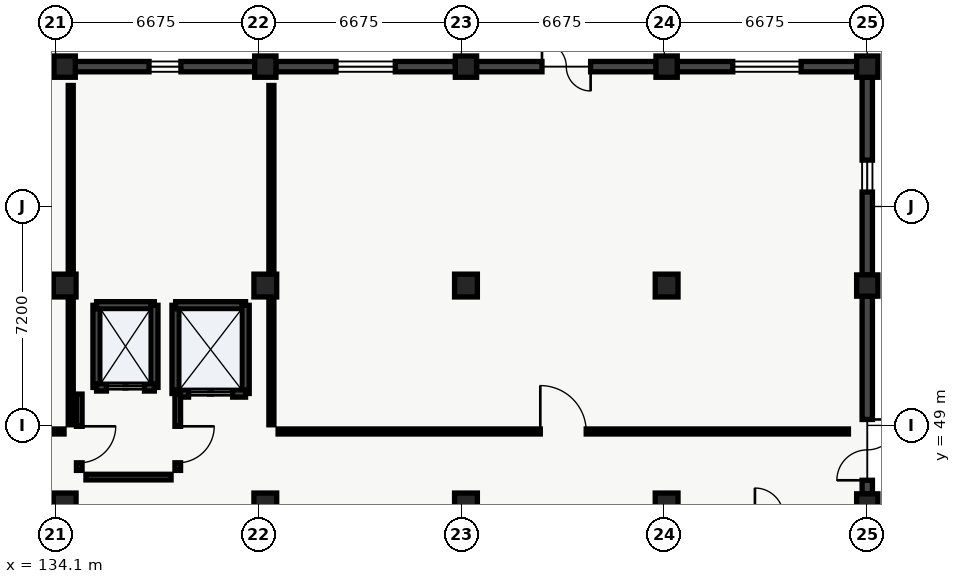
"""IFC4 building model, lengths in metres.
Left out: names, types, materials, properties, quantities, classifications, styles, units other than length and angle.
Written with IfcOpenShell. Run it as: python <this file> out.ifc"""

import sys

from ifc_helpers import new_model, si_unit, direction, frame, frame_2d, origin, origin_2d, place, context, subcontext, project, spatial, rectangle, extrude, element, fill, save


model = new_model("IFC4")
c1 = context("Model", 3, precision=1e-05, world=origin(), true_north=direction((0.0, 1.0)))
c2 = subcontext(c1, "Body", "Model", "MODEL_VIEW")
j1 = project(units=[si_unit("LENGTHUNIT", "METRE"), si_unit("PLANEANGLEUNIT", "RADIAN")], contexts=[c1])
p1 = place(None, origin())
s1 = spatial("IfcSite", under=j1, at=p1, CompositionType="ELEMENT")
p2 = place(p1, origin())
s2 = spatial("IfcBuilding", under=s1, at=p2, CompositionType="ELEMENT")
p3 = place(p2, origin())
s3 = spatial("IfcBuildingStorey", under=s2, at=p3, CompositionType="ELEMENT", Elevation=0.0)
for number, where, z_axis, x_axis in (
    (1, (134.4, 46.4, 0.0), (0.0, 0.0, 1.0), (1.0, 0.0, 0.0)),
    (2, (134.4, 53.6, 0.0), (0.0, 0.0, 1.0), (1.0, 0.0, 0.0)),
):
    element("IfcColumn", number, at=place(p3, frame(where, z_axis=z_axis, x_axis=x_axis)), inside=s3, PredefinedType="COLUMN", context=c2, shape_type="SweptSolid", body=[
        extrude(rectangle(XDim=0.75, YDim=0.75, at=origin_2d()), origin(), (0.0, 0.0, 1.0), 4.9),
    ])
p4 = place(p3, frame((134.4, 60.8, 0.0), z_axis=(0.0, 0.0, 1.0), x_axis=(1.0, 0.0, 0.0)))
e3 = element("IfcColumn", 3, at=p4, inside=s3, PredefinedType="COLUMN", context=c2, shape_type="SweptSolid", body=[
    extrude(rectangle(XDim=0.7, YDim=0.7, at=origin_2d()), origin(), (0.0, 0.0, 1.0), 4.9),
])
for number, where, z_axis, x_axis in (
    (4, (141.0, 46.4, 0.0), (0.0, 0.0, 1.0), (1.0, 0.0, 0.0)),
    (5, (141.0, 53.6, 0.0), (0.0, 0.0, 1.0), (1.0, 0.0, 0.0)),
):
    element("IfcColumn", number, at=place(p3, frame(where, z_axis=z_axis, x_axis=x_axis)), inside=s3, PredefinedType="COLUMN", context=c2, shape_type="SweptSolid", body=[
        extrude(rectangle(XDim=0.75, YDim=0.75, at=origin_2d()), origin(), (0.0, 0.0, 1.0), 4.9),
    ])
p5 = place(p3, frame((141.0, 60.8, 0.0), z_axis=(0.0, 0.0, 1.0), x_axis=(1.0, 0.0, 0.0)))
e6 = element("IfcColumn", 6, at=p5, inside=s3, PredefinedType="COLUMN", context=c2, shape_type="SweptSolid", body=[
    extrude(rectangle(XDim=0.7, YDim=0.7, at=origin_2d()), origin(), (0.0, 0.0, 1.0), 4.9),
])
for number, where, z_axis, x_axis in (
    (7, (147.6, 46.4, 0.0), (0.0, 0.0, 1.0), (1.0, 0.0, 0.0)),
    (8, (147.6, 53.6, 0.0), (0.0, 0.0, 1.0), (1.0, 0.0, 0.0)),
):
    element("IfcColumn", number, at=place(p3, frame(where, z_axis=z_axis, x_axis=x_axis)), inside=s3, PredefinedType="COLUMN", context=c2, shape_type="SweptSolid", body=[
        extrude(rectangle(XDim=0.75, YDim=0.75, at=origin_2d()), origin(), (0.0, 0.0, 1.0), 4.9),
    ])
p6 = place(p3, frame((147.6, 60.8, 0.0), z_axis=(0.0, 0.0, 1.0), x_axis=(1.0, 0.0, 0.0)))
e9 = element("IfcColumn", 9, at=p6, inside=s3, PredefinedType="COLUMN", context=c2, shape_type="SweptSolid", body=[
    extrude(rectangle(XDim=0.7, YDim=0.7, at=origin_2d()), origin(), (0.0, 0.0, 1.0), 4.9),
])
for number, where, z_axis, x_axis in (
    (10, (154.2, 46.4, 0.0), (0.0, 0.0, 1.0), (1.0, 0.0, 0.0)),
    (11, (154.2, 53.6, 0.0), (0.0, 0.0, 1.0), (1.0, 0.0, 0.0)),
):
    element("IfcColumn", number, at=place(p3, frame(where, z_axis=z_axis, x_axis=x_axis)), inside=s3, PredefinedType="COLUMN", context=c2, shape_type="SweptSolid", body=[
        extrude(rectangle(XDim=0.75, YDim=0.75, at=origin_2d()), origin(), (0.0, 0.0, 1.0), 4.9),
    ])
for number, where, z_axis, x_axis in (
    (12, (154.2, 60.8, 0.0), (0.0, 0.0, 1.0), (1.0, 0.0, 0.0)),
    (13, (160.8, 46.4, 0.0), (0.0, 0.0, 1.0), (1.0, 0.0, 0.0)),
    (14, (160.8, 53.6, 0.0), (0.0, 0.0, 1.0), (1.0, 0.0, 0.0)),
    (15, (160.8, 60.8, 0.0), (0.0, 0.0, 1.0), (1.0, 0.0, 0.0)),
):
    element("IfcColumn", number, at=place(p3, frame(where, z_axis=z_axis, x_axis=x_axis)), inside=s3, PredefinedType="COLUMN", context=c2, shape_type="SweptSolid", body=[
        extrude(rectangle(XDim=0.7, YDim=0.7, at=origin_2d()), origin(), (0.0, 0.0, 1.0), 4.9),
    ])
p7 = place(p3, frame((128.145, 60.8, 0.0), z_axis=(0.0, 0.0, 1.0), x_axis=(1.0, 0.0, 0.0)))
e16 = element("IfcWall", 16, at=p7, inside=s3, PredefinedType="SOLIDWALL", context=c2, shape_type="SweptSolid", body=[
    extrude(rectangle(XDim=5.91, YDim=0.34, at=frame_2d((2.955, 0.0))), origin(), (0.0, 0.0, 1.0), 4.435),
])
p8 = place(p7, frame((1.455, 0.0, 0.95)))
e17 = element("IfcOpeningElement", 17, at=p8, cuts=e16, PredefinedType="OPENING", context=c2, shape_type="SweptSolid", body=[
    extrude(rectangle(XDim=3.0, YDim=1.65, at=frame_2d((1.5, 0.825))), frame((0.0, 0.17, 0.0), z_axis=(0.0, -1.0, 0.0), x_axis=(1.0, 0.0, 0.0)), (0.0, 0.0, 1.0), 0.34),
])
p9 = place(p3, frame((134.745, 60.8, 0.0), z_axis=(0.0, 0.0, 1.0), x_axis=(1.0, 0.0, 0.0)))
e18 = element("IfcWall", 18, at=p9, inside=s3, PredefinedType="SOLIDWALL", context=c2, shape_type="SweptSolid", body=[
    extrude(rectangle(XDim=5.91, YDim=0.34, at=frame_2d((2.955, 0.0))), origin(), (0.0, 0.0, 1.0), 4.435),
])
p10 = place(p9, frame((2.43, 0.0, 0.95)))
e19 = element("IfcOpeningElement", 19, at=p10, cuts=e18, PredefinedType="OPENING", context=c2, shape_type="SweptSolid", body=[
    extrude(rectangle(XDim=1.05, YDim=1.2, at=frame_2d((0.525, 0.6))), frame((0.0, 0.17, 0.0), z_axis=(0.0, -1.0, 0.0), x_axis=(1.0, 0.0, 0.0)), (0.0, 0.0, 1.0), 0.34),
])
p11 = place(p3, frame((141.345, 60.8, 0.0), z_axis=(0.0, 0.0, 1.0), x_axis=(1.0, 0.0, 0.0)))
e20 = element("IfcWall", 20, at=p11, inside=s3, PredefinedType="SOLIDWALL", context=c2, shape_type="SweptSolid", body=[
    extrude(rectangle(XDim=5.91, YDim=0.34, at=frame_2d((2.955, 0.0))), origin(), (0.0, 0.0, 1.0), 4.435),
])
p12 = place(p11, frame((1.98, 0.0, 0.95)))
e21 = element("IfcOpeningElement", 21, at=p12, cuts=e20, PredefinedType="OPENING", context=c2, shape_type="SweptSolid", body=[
    extrude(rectangle(XDim=1.95, YDim=1.5, at=frame_2d((0.975, 0.75))), frame((0.0, 0.17, 0.0), z_axis=(0.0, -1.0, 0.0), x_axis=(1.0, 0.0, 0.0)), (0.0, 0.0, 1.0), 0.34),
])
p13 = place(p3, frame((147.945, 60.8, 0.0), z_axis=(0.0, 0.0, 1.0), x_axis=(1.0, 0.0, 0.0)))
e22 = element("IfcWall", 22, at=p13, inside=s3, PredefinedType="SOLIDWALL", context=c2, shape_type="SweptSolid", body=[
    extrude(rectangle(XDim=5.91, YDim=0.34, at=frame_2d((2.955, 0.0))), origin(), (0.0, 0.0, 1.0), 4.435),
])
p14 = place(p13, frame((2.155, 0.0, 0.0)))
e23 = element("IfcOpeningElement", 23, at=p14, cuts=e22, PredefinedType="OPENING", context=c2, shape_type="SweptSolid", body=[
    extrude(rectangle(XDim=1.6, YDim=2.2, at=frame_2d((0.8, 1.1))), frame((0.0, 0.17, 0.0), z_axis=(0.0, -1.0, 0.0), x_axis=(1.0, 0.0, 0.0)), (0.0, 0.0, 1.0), 0.34),
])
p15 = place(p3, frame((154.545, 60.8, 0.0), z_axis=(0.0, 0.0, 1.0), x_axis=(1.0, 0.0, 0.0)))
e24 = element("IfcWall", 24, at=p15, inside=s3, PredefinedType="SOLIDWALL", context=c2, shape_type="SweptSolid", body=[
    extrude(rectangle(XDim=5.91, YDim=0.34, at=frame_2d((2.955, 0.0))), origin(), (0.0, 0.0, 1.0), 4.435),
])
p16 = place(p15, frame((1.83, 0.0, 0.95)))
e25 = element("IfcOpeningElement", 25, at=p16, cuts=e24, PredefinedType="OPENING", context=c2, shape_type="SweptSolid", body=[
    extrude(rectangle(XDim=2.25, YDim=1.55, at=frame_2d((1.125, 0.775))), frame((0.0, 0.17, 0.0), z_axis=(0.0, -1.0, 0.0), x_axis=(1.0, 0.0, 0.0)), (0.0, 0.0, 1.0), 0.34),
])
p17 = place(p3, frame((160.8, 60.455, 0.0), z_axis=(0.0, 0.0, 1.0), x_axis=(0.0, -1.0, 0.0)))
e26 = element("IfcWall", 26, at=p17, inside=s3, PredefinedType="SOLIDWALL", context=c2, shape_type="SweptSolid", body=[
    extrude(rectangle(XDim=6.51, YDim=0.34, at=frame_2d((3.255, 0.0))), origin(), (0.0, 0.0, 1.0), 4.435),
])
p18 = place(p17, frame((2.73, 0.0, 0.95)))
e27 = element("IfcOpeningElement", 27, at=p18, cuts=e26, PredefinedType="OPENING", context=c2, shape_type="SweptSolid", body=[
    extrude(rectangle(XDim=1.05, YDim=1.2, at=frame_2d((0.525, 0.6))), frame((0.0, 0.17, 0.0), z_axis=(0.0, -1.0, 0.0), x_axis=(1.0, 0.0, 0.0)), (0.0, 0.0, 1.0), 0.34),
])
p19 = place(p3, frame((160.8, 53.255, 0.0), z_axis=(0.0, 0.0, 1.0), x_axis=(0.0, -1.0, 0.0)))
e28 = element("IfcWall", 28, at=p19, inside=s3, PredefinedType="SOLIDWALL", context=c2, shape_type="SweptSolid", body=[
    extrude(rectangle(XDim=6.51, YDim=0.34, at=frame_2d((3.255, 0.0))), origin(), (0.0, 0.0, 1.0), 4.435),
])
p20 = place(p19, frame((4.06, 0.0, 0.0)))
e29 = element("IfcOpeningElement", 29, at=p20, cuts=e28, PredefinedType="OPENING", context=c2, shape_type="SweptSolid", body=[
    extrude(rectangle(XDim=2.0, YDim=2.25, at=frame_2d((1.0, 1.125))), frame((0.0, 0.17, 0.0), z_axis=(0.0, -1.0, 0.0), x_axis=(1.0, 0.0, 0.0)), (0.0, 0.0, 1.0), 0.34),
])
p21 = place(p3, frame((135.45, 50.25, 0.0), z_axis=(0.0, 0.0, 1.0), x_axis=(0.0, 1.0, 0.0)))
e30 = element("IfcWall", 30, at=p21, inside=s3, PredefinedType="SHEAR", context=c2, shape_type="SweptSolid", body=[
    extrude(rectangle(XDim=2.7, YDim=0.24, at=frame_2d((1.35, 0.0))), origin(), (0.0, 0.0, 1.0), 4.88),
])
p22 = place(p3, frame((135.45, 52.95, 0.0), z_axis=(0.0, 0.0, 1.0), x_axis=(1.0, 0.0, 0.0)))
e31 = element("IfcWall", 31, at=p22, inside=s3, PredefinedType="SHEAR", context=c2, shape_type="SweptSolid", body=[
    extrude(rectangle(XDim=1.9, YDim=0.24, at=frame_2d((0.95, 0.0))), origin(), (0.0, 0.0, 1.0), 4.88),
])
p23 = place(p3, frame((137.35, 52.95, 0.0), z_axis=(0.0, 0.0, 1.0), x_axis=(0.0, -1.0, 0.0)))
e32 = element("IfcWall", 32, at=p23, inside=s3, PredefinedType="SHEAR", context=c2, shape_type="SweptSolid", body=[
    extrude(rectangle(XDim=2.7, YDim=0.24, at=frame_2d((1.35, 0.0))), origin(), (0.0, 0.0, 1.0), 4.88),
])
p24 = place(p3, frame((137.35, 50.25, 0.0), z_axis=(0.0, 0.0, 1.0), x_axis=(-1.0, 0.0, 0.0)))
e33 = element("IfcWall", 33, at=p24, inside=s3, PredefinedType="SHEAR", context=c2, shape_type="SweptSolid", body=[
    extrude(rectangle(XDim=1.9, YDim=0.24, at=frame_2d((0.95, 0.0))), origin(), (0.0, 0.0, 1.0), 4.88),
])
p25 = place(p24, frame((0.325, 0.0, 0.0)))
e34 = element("IfcOpeningElement", 34, at=p25, cuts=e33, PredefinedType="OPENING", context=c2, shape_type="SweptSolid", body=[
    extrude(rectangle(XDim=1.25, YDim=2.2, at=frame_2d((0.625, 1.1))), frame((0.0, 0.12, 0.0), z_axis=(0.0, -1.0, 0.0), x_axis=(1.0, 0.0, 0.0)), (0.0, 0.0, 1.0), 0.24),
])
p26 = place(p3, frame((138.05, 50.05, 0.0), z_axis=(0.0, 0.0, 1.0), x_axis=(0.0, 1.0, 0.0)))
e35 = element("IfcWall", 35, at=p26, inside=s3, PredefinedType="SHEAR", context=c2, shape_type="SweptSolid", body=[
    extrude(rectangle(XDim=2.9, YDim=0.24, at=frame_2d((1.45, 0.0))), origin(), (0.0, 0.0, 1.0), 4.88),
])
p27 = place(p3, frame((138.05, 52.95, 0.0), z_axis=(0.0, 0.0, 1.0), x_axis=(1.0, 0.0, 0.0)))
e36 = element("IfcWall", 36, at=p27, inside=s3, PredefinedType="SHEAR", context=c2, shape_type="SweptSolid", body=[
    extrude(rectangle(XDim=2.3, YDim=0.24, at=frame_2d((1.15, 0.0))), origin(), (0.0, 0.0, 1.0), 4.88),
])
p28 = place(p3, frame((140.35, 52.95, 0.0), z_axis=(0.0, 0.0, 1.0), x_axis=(0.0, -1.0, 0.0)))
e37 = element("IfcWall", 37, at=p28, inside=s3, PredefinedType="SHEAR", context=c2, shape_type="SweptSolid", body=[
    extrude(rectangle(XDim=2.9, YDim=0.24, at=frame_2d((1.45, 0.0))), origin(), (0.0, 0.0, 1.0), 4.88),
])
p29 = place(p3, frame((140.35, 50.05, 0.0), z_axis=(0.0, 0.0, 1.0), x_axis=(-1.0, 0.0, 0.0)))
e38 = element("IfcWall", 38, at=p29, inside=s3, PredefinedType="SHEAR", context=c2, shape_type="SweptSolid", body=[
    extrude(rectangle(XDim=2.3, YDim=0.24, at=frame_2d((1.15, 0.0))), origin(), (0.0, 0.0, 1.0), 4.88),
])
p30 = place(p29, frame((0.425, 0.0, 0.0)))
e39 = element("IfcOpeningElement", 39, at=p30, cuts=e38, PredefinedType="OPENING", context=c2, shape_type="SweptSolid", body=[
    extrude(rectangle(XDim=1.45, YDim=2.3, at=frame_2d((0.725, 1.15))), frame((0.0, 0.12, 0.0), z_axis=(0.0, -1.0, 0.0), x_axis=(1.0, 0.0, 0.0)), (0.0, 0.0, 1.0), 0.24),
])
p31 = place(p3, frame((135.1, 47.3, 0.0), z_axis=(0.0, 0.0, 1.0), x_axis=(1.0, 0.0, 0.0)))
e40 = element("IfcWall", 40, at=p31, inside=s3, PredefinedType="SOLIDWALL", context=c2, shape_type="SweptSolid", body=[
    extrude(rectangle(XDim=2.8, YDim=0.185, at=frame_2d((1.4, 0.0))), origin(), (0.0, 0.0, 1.0), 4.55),
])
p32 = place(p3, frame((138.12, 47.52, 0.0), z_axis=(0.0, 0.0, 1.0), x_axis=(0.0, 1.0, 0.0)))
e41 = element("IfcWall", 41, at=p32, inside=s3, PredefinedType="SOLIDWALL", context=c2, shape_type="SweptSolid", body=[
    extrude(rectangle(XDim=2.51, YDim=0.185, at=frame_2d((1.255, 0.0))), origin(), (0.0, 0.0, 1.0), 4.55),
])
p33 = place(p32, frame((0.25, 0.0, 0.0)))
e42 = element("IfcOpeningElement", 42, at=p33, cuts=e41, PredefinedType="OPENING", context=c2, shape_type="SweptSolid", body=[
    extrude(rectangle(XDim=1.2, YDim=2.15, at=frame_2d((0.6, 1.075))), frame((0.0, 0.093, 0.0), z_axis=(0.0, -1.0, 0.0), x_axis=(1.0, 0.0, 0.0)), (0.0, 0.0, 1.0), 0.185),
])
p34 = place(p3, frame((134.88, 50.03, 0.0), z_axis=(0.0, 0.0, 1.0), x_axis=(0.0, -1.0, 0.0)))
e43 = element("IfcWall", 43, at=p34, inside=s3, PredefinedType="SOLIDWALL", context=c2, shape_type="SweptSolid", body=[
    extrude(rectangle(XDim=2.51, YDim=0.185, at=frame_2d((1.255, 0.0))), origin(), (0.0, 0.0, 1.0), 4.55),
])
p35 = place(p34, frame((1.06, 0.0, 0.0)))
e44 = element("IfcOpeningElement", 44, at=p35, cuts=e43, PredefinedType="OPENING", context=c2, shape_type="SweptSolid", body=[
    extrude(rectangle(XDim=1.2, YDim=2.15, at=frame_2d((0.6, 1.075))), frame((0.0, 0.093, 0.0), z_axis=(0.0, -1.0, 0.0), x_axis=(1.0, 0.0, 0.0)), (0.0, 0.0, 1.0), 0.185),
])
p36 = place(p3, frame((115.22, 48.8, 0.0), z_axis=(0.0, 0.0, 1.0), x_axis=(1.0, 0.0, 0.0)))
e45 = element("IfcWall", 45, at=p36, inside=s3, PredefinedType="PARTITIONING", context=c2, shape_type="SweptSolid", body=[
    extrude(rectangle(XDim=19.16, YDim=0.165, at=frame_2d((9.58, 0.0))), origin(), (0.0, 0.0, 1.0), 4.485),
])
p37 = place(p36, frame((8.84, 0.0, 0.0)))
e46 = element("IfcOpeningElement", 46, at=p37, cuts=e45, PredefinedType="OPENING", context=c2, shape_type="SweptSolid", body=[
    extrude(rectangle(XDim=1.48, YDim=2.1, at=frame_2d((0.74, 1.05))), frame((0.0, 0.083, 0.0), z_axis=(0.0, -1.0, 0.0), x_axis=(1.0, 0.0, 0.0)), (0.0, 0.0, 1.0), 0.165),
])
p38 = place(p3, frame((134.6, 49.02, 0.0), z_axis=(0.0, 0.0, 1.0), x_axis=(0.0, 1.0, 0.0)))
e47 = element("IfcWall", 47, at=p38, inside=s3, PredefinedType="PARTITIONING", context=c2, shape_type="SweptSolid", body=[
    extrude(rectangle(XDim=11.16, YDim=0.165, at=frame_2d((5.58, 0.0))), origin(), (0.0, 0.0, 1.0), 4.235),
])
p39 = place(p3, frame((141.42, 48.8, 0.0), z_axis=(0.0, 0.0, 1.0), x_axis=(1.0, 0.0, 0.0)))
e48 = element("IfcWall", 48, at=p39, inside=s3, PredefinedType="PARTITIONING", context=c2, shape_type="SweptSolid", body=[
    extrude(rectangle(XDim=18.76, YDim=0.165, at=frame_2d((9.38, 0.0))), origin(), (0.0, 0.0, 1.0), 4.485),
])
p40 = place(p39, frame((8.625, 0.0, 0.0)))
e49 = element("IfcOpeningElement", 49, at=p40, cuts=e48, PredefinedType="OPENING", context=c2, shape_type="SweptSolid", body=[
    extrude(rectangle(XDim=1.51, YDim=2.12, at=frame_2d((0.755, 1.06))), frame((0.0, 0.083, 0.0), z_axis=(0.0, -1.0, 0.0), x_axis=(1.0, 0.0, 0.0)), (0.0, 0.0, 1.0), 0.165),
])
p41 = place(p3, frame((141.2, 60.18, 0.0), z_axis=(0.0, 0.0, 1.0), x_axis=(0.0, -1.0, 0.0)))
e50 = element("IfcWall", 50, at=p41, inside=s3, PredefinedType="PARTITIONING", context=c2, shape_type="SweptSolid", body=[
    extrude(rectangle(XDim=11.16, YDim=0.165, at=frame_2d((5.58, 0.0))), origin(), (0.0, 0.0, 1.0), 4.235),
])
p42 = place(p10, origin())
e51 = element("IfcWindow", 51, at=p42, inside=s3, PartitioningType="SINGLE_PANEL", PredefinedType="WINDOW", context=c2, shape_type="SweptSolid", body=[
    extrude(rectangle(XDim=1.05, YDim=1.2, at=frame_2d((0.525, 0.6))), frame((0.0, 0.03, 0.0), z_axis=(0.0, -1.0, 0.0), x_axis=(1.0, 0.0, 0.0)), (0.0, 0.0, 1.0), 0.06),
])
fill(e19, e51)
p43 = place(p12, origin())
e52 = element("IfcWindow", 52, at=p43, inside=s3, PartitioningType="SINGLE_PANEL", PredefinedType="WINDOW", context=c2, shape_type="SweptSolid", body=[
    extrude(rectangle(XDim=1.95, YDim=1.5, at=frame_2d((0.975, 0.75))), frame((0.0, 0.03, 0.0), z_axis=(0.0, -1.0, 0.0), x_axis=(1.0, 0.0, 0.0)), (0.0, 0.0, 1.0), 0.06),
])
fill(e21, e52)
p44 = place(p14, origin())
e53 = element("IfcDoor", 53, at=p44, inside=s3, OperationType="DOUBLE_DOOR_SINGLE_SWING", PredefinedType="DOOR", context=c2, shape_type="SweptSolid", body=[
    extrude(rectangle(XDim=1.6, YDim=2.2, at=frame_2d((0.8, 1.1))), frame((0.0, 0.025, 0.0), z_axis=(0.0, -1.0, 0.0), x_axis=(1.0, 0.0, 0.0)), (0.0, 0.0, 1.0), 0.05),
])
fill(e23, e53)
p45 = place(p16, origin())
e54 = element("IfcWindow", 54, at=p45, inside=s3, PartitioningType="SINGLE_PANEL", PredefinedType="WINDOW", context=c2, shape_type="SweptSolid", body=[
    extrude(rectangle(XDim=2.25, YDim=1.55, at=frame_2d((1.125, 0.775))), frame((0.0, 0.03, 0.0), z_axis=(0.0, -1.0, 0.0), x_axis=(1.0, 0.0, 0.0)), (0.0, 0.0, 1.0), 0.06),
])
fill(e25, e54)
p46 = place(p18, origin())
e55 = element("IfcWindow", 55, at=p46, inside=s3, PartitioningType="SINGLE_PANEL", PredefinedType="WINDOW", context=c2, shape_type="SweptSolid", body=[
    extrude(rectangle(XDim=1.05, YDim=1.2, at=frame_2d((0.525, 0.6))), frame((0.0, 0.03, 0.0), z_axis=(0.0, -1.0, 0.0), x_axis=(1.0, 0.0, 0.0)), (0.0, 0.0, 1.0), 0.06),
])
fill(e27, e55)
p47 = place(p20, origin())
e56 = element("IfcDoor", 56, at=p47, inside=s3, OperationType="DOUBLE_DOOR_SINGLE_SWING", PredefinedType="DOOR", context=c2, shape_type="SweptSolid", body=[
    extrude(rectangle(XDim=2.0, YDim=2.25, at=frame_2d((1.0, 1.125))), frame((0.0, 0.025, 0.0), z_axis=(0.0, -1.0, 0.0), x_axis=(1.0, 0.0, 0.0)), (0.0, 0.0, 1.0), 0.05),
])
fill(e29, e56)
p48 = place(p25, origin())
e57 = element("IfcDoor", 57, at=p48, inside=s3, OperationType="SLIDING_TO_RIGHT", PredefinedType="DOOR", context=c2, shape_type="SweptSolid", body=[
    extrude(rectangle(XDim=1.25, YDim=2.2, at=frame_2d((0.625, 1.1))), frame((0.0, 0.025, 0.0), z_axis=(0.0, -1.0, 0.0), x_axis=(1.0, 0.0, 0.0)), (0.0, 0.0, 1.0), 0.05),
])
fill(e34, e57)
p49 = place(p30, origin())
e58 = element("IfcDoor", 58, at=p49, inside=s3, OperationType="DOUBLE_DOOR_SLIDING", PredefinedType="DOOR", context=c2, shape_type="SweptSolid", body=[
    extrude(rectangle(XDim=1.45, YDim=2.3, at=frame_2d((0.725, 1.15))), frame((0.0, 0.025, 0.0), z_axis=(0.0, -1.0, 0.0), x_axis=(1.0, 0.0, 0.0)), (0.0, 0.0, 1.0), 0.05),
])
fill(e39, e58)
p50 = place(p33, origin())
e59 = element("IfcDoor", 59, at=p50, inside=s3, OperationType="SINGLE_SWING_RIGHT", PredefinedType="DOOR", context=c2, shape_type="SweptSolid", body=[
    extrude(rectangle(XDim=1.2, YDim=2.15, at=frame_2d((0.6, 1.075))), frame((0.0, 0.025, 0.0), z_axis=(0.0, -1.0, 0.0), x_axis=(1.0, 0.0, 0.0)), (0.0, 0.0, 1.0), 0.05),
])
fill(e42, e59)
p51 = place(p35, origin())
e60 = element("IfcDoor", 60, at=p51, inside=s3, OperationType="SINGLE_SWING_LEFT", PredefinedType="DOOR", context=c2, shape_type="SweptSolid", body=[
    extrude(rectangle(XDim=1.2, YDim=2.15, at=frame_2d((0.6, 1.075))), frame((0.0, 0.025, 0.0), z_axis=(0.0, -1.0, 0.0), x_axis=(1.0, 0.0, 0.0)), (0.0, 0.0, 1.0), 0.05),
])
fill(e44, e60)
p52 = place(p40, origin())
e61 = element("IfcDoor", 61, at=p52, inside=s3, OperationType="SINGLE_SWING_LEFT", PredefinedType="DOOR", context=c2, shape_type="SweptSolid", body=[
    extrude(rectangle(XDim=1.51, YDim=2.12, at=frame_2d((0.755, 1.06))), frame((0.0, 0.025, 0.0), z_axis=(0.0, -1.0, 0.0), x_axis=(1.0, 0.0, 0.0)), (0.0, 0.0, 1.0), 0.05),
])
fill(e49, e61)
save(model, sys.argv[1])
